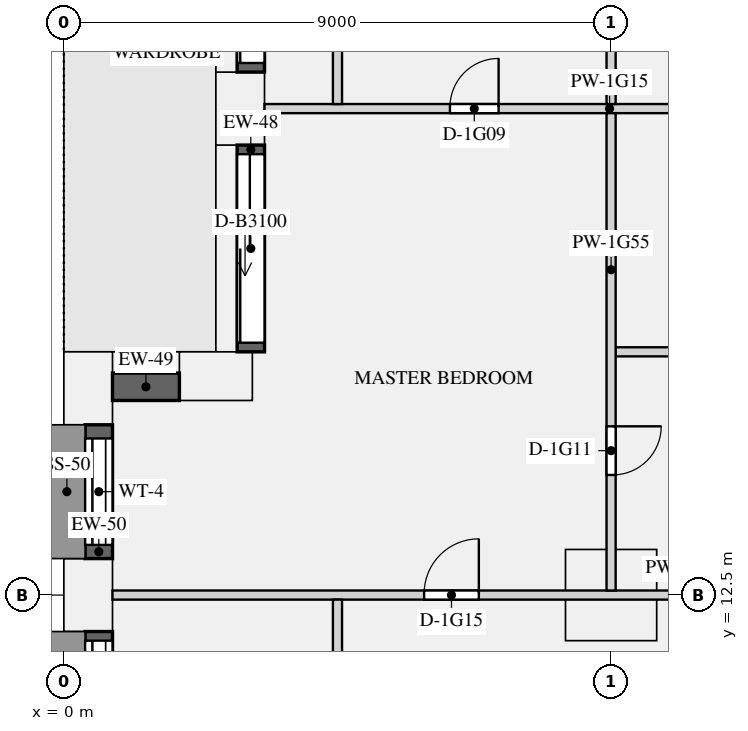
"""IFC4 building model, lengths in metres.
Left out: names, types, materials, properties, quantities, classifications, styles, units other than length and angle.
Written with IfcOpenShell. Run it as: python <this file> out.ifc"""

import sys

from ifc_helpers import new_model, si_unit, direction, frame, frame_2d, origin, origin_2d, place, context, subcontext, project, spatial, rectangle, extrude, element, fill, save


model = new_model("IFC4")
c1 = context("Model", 3, precision=1e-05, world=origin(), true_north=direction((0.0, 1.0)))
c2 = subcontext(c1, "Body", "Model", "MODEL_VIEW")
j1 = project(units=[si_unit("LENGTHUNIT", "METRE"), si_unit("PLANEANGLEUNIT", "RADIAN")], contexts=[c1])
p1 = place(None, origin())
s1 = spatial("IfcSite", under=j1, at=p1, CompositionType="ELEMENT")
p2 = place(p1, origin())
s2 = spatial("IfcBuilding", under=s1, at=p2, CompositionType="ELEMENT")
p3 = place(p2, frame((0.0, 0.0, 69.9)))
s3 = spatial("IfcBuildingStorey", under=s2, at=p3, CompositionType="ELEMENT", Elevation=69.9)
for number, where, z_axis, x_axis in (
    (1, (2.9, 20.5, 0.0), (0.0, 0.0, 1.0), (0.0, -1.0, 0.0)),
    (2, (2.5, 16.1, 0.0), (0.0, 0.0, 1.0), (-1.0, 0.0, 0.0)),
    (3, (0.4, 15.9, 0.0), (0.0, 0.0, 1.0), (0.0, -1.0, 0.0)),
    (4, (0.4, 12.5, 0.0), (0.0, 0.0, 1.0), (0.0, -1.0, 0.0)),
):
    element("IfcColumn", number, at=place(p3, frame(where, z_axis=z_axis, x_axis=x_axis)), inside=s3, PredefinedType="USERDEFINED", context=c2, shape_type="SweptSolid", body=[
        extrude(rectangle(XDim=1.2, YDim=0.8, at=origin_2d()), origin(), (0.0, 0.0, 1.0), 2.65),
    ])
p4 = place(p3, frame((9.0, 12.5, 0.0), z_axis=(0.0, 0.0, 1.0), x_axis=(1.0, 0.0, 0.0)))
e5 = element("IfcColumn", 5, at=p4, inside=s3, PredefinedType="COLUMN", context=c2, shape_type="SweptSolid", body=[
    extrude(rectangle(XDim=1.5, YDim=1.5, at=origin_2d()), origin(), (0.0, 0.0, 1.0), 3.15),
])
p5 = place(p3, frame((3.075, 23.9, 0.0), z_axis=(0.0, 0.0, 1.0), x_axis=(0.0, -1.0, 0.0)))
e6 = element("IfcWall", 6, at=p5, inside=s3, PredefinedType="SOLIDWALL", context=c2, shape_type="SweptSolid", body=[
    extrude(rectangle(XDim=2.8, YDim=0.45, at=frame_2d((1.4, 0.0))), origin(), (0.0, 0.0, 1.0), 2.65),
])
p6 = place(p5, frame((0.15, 0.0, 0.0)))
e7 = element("IfcOpeningElement", 7, at=p6, cuts=e6, PredefinedType="OPENING", context=c2, shape_type="SweptSolid", body=[
    extrude(rectangle(XDim=2.5, YDim=2.3, at=frame_2d((1.25, 1.15))), frame((0.0, 0.235, 0.0), z_axis=(0.0, -1.0, 0.0), x_axis=(1.0, 0.0, 0.0)), (0.0, 0.0, 1.0), 0.47),
])
p7 = place(p3, frame((3.075, 19.9, 0.0), z_axis=(0.0, 0.0, 1.0), x_axis=(0.0, -1.0, 0.0)))
e8 = element("IfcWall", 8, at=p7, inside=s3, PredefinedType="SOLIDWALL", context=c2, shape_type="SweptSolid", body=[
    extrude(rectangle(XDim=3.4, YDim=0.45, at=frame_2d((1.7, 0.0))), origin(), (0.0, 0.0, 1.0), 2.65),
])
p8 = place(p7, frame((0.15, 0.0, 0.0)))
e9 = element("IfcOpeningElement", 9, at=p8, cuts=e8, PredefinedType="OPENING", context=c2, shape_type="SweptSolid", body=[
    extrude(rectangle(XDim=3.1, YDim=2.3, at=frame_2d((1.55, 1.15))), frame((0.0, 0.235, 0.0), z_axis=(0.0, -1.0, 0.0), x_axis=(1.0, 0.0, 0.0)), (0.0, 0.0, 1.0), 0.47),
])
p9 = place(p3, frame((1.9, 15.925, 0.9), z_axis=(0.0, 0.0, 1.0), x_axis=(-1.0, 0.0, 0.0)))
e10 = element("IfcWall", 10, at=p9, inside=s3, PredefinedType="SOLIDWALL", context=c2, shape_type="SweptSolid", body=[
    extrude(rectangle(XDim=1.1, YDim=0.45, at=frame_2d((0.55, 0.0))), origin(), (0.0, 0.0, 1.0), 1.75),
])
p10 = place(p3, frame((0.575, 15.3, 0.9), z_axis=(0.0, 0.0, 1.0), x_axis=(0.0, -1.0, 0.0)))
e11 = element("IfcWall", 11, at=p10, inside=s3, PredefinedType="SOLIDWALL", context=c2, shape_type="SweptSolid", body=[
    extrude(rectangle(XDim=2.2, YDim=0.45, at=frame_2d((1.1, 0.0))), origin(), (0.0, 0.0, 1.0), 1.75),
])
p11 = place(p10, frame((0.225, 0.0, 0.15)))
e12 = element("IfcOpeningElement", 12, at=p11, cuts=e11, PredefinedType="OPENING", context=c2, shape_type="SweptSolid", body=[
    extrude(rectangle(XDim=1.75, YDim=1.5, at=frame_2d((0.875, 0.75))), frame((0.0, 0.235, 0.0), z_axis=(0.0, -1.0, 0.0), x_axis=(1.0, 0.0, 0.0)), (0.0, 0.0, 1.0), 0.47),
])
p12 = place(p3, frame((0.575, 11.9, 0.9), z_axis=(0.0, 0.0, 1.0), x_axis=(0.0, -1.0, 0.0)))
e13 = element("IfcWall", 13, at=p12, inside=s3, PredefinedType="SOLIDWALL", context=c2, shape_type="SweptSolid", body=[
    extrude(rectangle(XDim=2.8, YDim=0.45, at=frame_2d((1.4, 0.0))), origin(), (0.0, 0.0, 1.0), 1.75),
])
p13 = place(p12, frame((0.15, 0.0, 0.15)))
e14 = element("IfcOpeningElement", 14, at=p13, cuts=e13, PredefinedType="OPENING", context=c2, shape_type="SweptSolid", body=[
    extrude(rectangle(XDim=2.5, YDim=1.5, at=frame_2d((1.25, 0.75))), frame((0.0, 0.235, 0.0), z_axis=(0.0, -1.0, 0.0), x_axis=(1.0, 0.0, 0.0)), (0.0, 0.0, 1.0), 0.47),
])
p14 = place(p3, frame((0.8, 12.5, 0.0), z_axis=(0.0, 0.0, 1.0), x_axis=(1.0, 0.0, 0.0)))
e15 = element("IfcWall", 15, at=p14, inside=s3, PredefinedType="PARTITIONING", context=c2, shape_type="SweptSolid", body=[
    extrude(rectangle(XDim=12.775, YDim=0.15, at=frame_2d((6.387, 0.0))), origin(), (0.0, 0.0, 1.0), 2.65),
])
p15 = place(p14, frame((5.125, 0.0, 0.0)))
e16 = element("IfcOpeningElement", 16, at=p15, cuts=e15, PredefinedType="OPENING", context=c2, shape_type="SweptSolid", body=[
    extrude(rectangle(XDim=0.9, YDim=2.1, at=frame_2d((0.45, 1.05))), frame((0.0, 0.085, 0.0), z_axis=(0.0, -1.0, 0.0), x_axis=(1.0, 0.0, 0.0)), (0.0, 0.0, 1.0), 0.17),
])
p16 = place(p3, frame((3.3, 20.5, 0.0), z_axis=(0.0, 0.0, 1.0), x_axis=(1.0, 0.0, 0.0)))
e17 = element("IfcWall", 17, at=p16, inside=s3, PredefinedType="PARTITIONING", context=c2, shape_type="SweptSolid", body=[
    extrude(rectangle(XDim=10.275, YDim=0.15, at=frame_2d((5.137, 0.0))), origin(), (0.0, 0.0, 1.0), 2.65),
])
p17 = place(p16, frame((7.5, 0.0, 0.0)))
e18 = element("IfcOpeningElement", 18, at=p17, cuts=e17, PredefinedType="OPENING", context=c2, shape_type="SweptSolid", body=[
    extrude(rectangle(XDim=0.9, YDim=2.1, at=frame_2d((0.45, 1.05))), frame((0.0, 0.085, 0.0), z_axis=(0.0, -1.0, 0.0), x_axis=(1.0, 0.0, 0.0)), (0.0, 0.0, 1.0), 0.17),
])
p18 = place(p16, frame((3.05, 0.0, 0.0)))
e19 = element("IfcOpeningElement", 19, at=p18, cuts=e17, PredefinedType="OPENING", context=c2, shape_type="SweptSolid", body=[
    extrude(rectangle(XDim=0.8, YDim=2.1, at=frame_2d((0.4, 1.05))), frame((0.0, 0.085, 0.0), z_axis=(0.0, -1.0, 0.0), x_axis=(1.0, 0.0, 0.0)), (0.0, 0.0, 1.0), 0.17),
])
p19 = place(p3, frame((9.075, 16.5, 0.0), z_axis=(0.0, 0.0, 1.0), x_axis=(1.0, 0.0, 0.0)))
e20 = element("IfcWall", 20, at=p19, inside=s3, PredefinedType="PARTITIONING", context=c2, shape_type="SweptSolid", body=[
    extrude(rectangle(XDim=4.35, YDim=0.15, at=frame_2d((2.175, 0.0))), origin(), (0.0, 0.0, 1.0), 2.65),
])
p20 = place(p3, frame((4.5, 5.3, 0.0), z_axis=(0.0, 0.0, 1.0), x_axis=(0.0, 1.0, 0.0)))
e21 = element("IfcWall", 21, at=p20, inside=s3, PredefinedType="PARTITIONING", context=c2, shape_type="SweptSolid", body=[
    extrude(rectangle(XDim=7.125, YDim=0.15, at=frame_2d((3.562, 0.0))), origin(), (0.0, 0.0, 1.0), 2.65),
])
p21 = place(p20, frame((4.75, 0.0, 0.0)))
e22 = element("IfcOpeningElement", 22, at=p21, cuts=e21, PredefinedType="OPENING", context=c2, shape_type="SweptSolid", body=[
    extrude(rectangle(XDim=0.9, YDim=2.1, at=frame_2d((0.45, 1.05))), frame((0.0, 0.085, 0.0), z_axis=(0.0, -1.0, 0.0), x_axis=(1.0, 0.0, 0.0)), (0.0, 0.0, 1.0), 0.17),
])
p22 = place(p20, frame((0.775, 0.0, 0.0)))
e23 = element("IfcOpeningElement", 23, at=p22, cuts=e21, PredefinedType="OPENING", context=c2, shape_type="SweptSolid", body=[
    extrude(rectangle(XDim=1.5, YDim=2.1, at=frame_2d((0.75, 1.05))), frame((0.0, 0.085, 0.0), z_axis=(0.0, -1.0, 0.0), x_axis=(1.0, 0.0, 0.0)), (0.0, 0.0, 1.0), 0.17),
])
p23 = place(p3, frame((4.5, 20.575, 0.0), z_axis=(0.0, 0.0, 1.0), x_axis=(0.0, 1.0, 0.0)))
e24 = element("IfcWall", 24, at=p23, inside=s3, PredefinedType="PARTITIONING", context=c2, shape_type="SweptSolid", body=[
    extrude(rectangle(XDim=3.35, YDim=0.15, at=frame_2d((1.675, 0.0))), origin(), (0.0, 0.0, 1.0), 2.65),
])
p24 = place(p23, frame((1.275, 0.0, 0.0)))
e25 = element("IfcOpeningElement", 25, at=p24, cuts=e24, PredefinedType="OPENING", context=c2, shape_type="SweptSolid", body=[
    extrude(rectangle(XDim=0.8, YDim=2.1, at=frame_2d((0.4, 1.05))), frame((0.0, 0.085, 0.0), z_axis=(0.0, -1.0, 0.0), x_axis=(1.0, 0.0, 0.0)), (0.0, 0.0, 1.0), 0.17),
])
p25 = place(p3, frame((9.0, 12.575, 0.0), z_axis=(0.0, 0.0, 1.0), x_axis=(0.0, 1.0, 0.0)))
e26 = element("IfcWall", 26, at=p25, inside=s3, PredefinedType="PARTITIONING", context=c2, shape_type="SweptSolid", body=[
    extrude(rectangle(XDim=7.85, YDim=0.15, at=frame_2d((3.925, 0.0))), origin(), (0.0, 0.0, 1.0), 2.65),
])
p26 = place(p25, frame((1.9, 0.0, 0.0)))
e27 = element("IfcOpeningElement", 27, at=p26, cuts=e26, PredefinedType="OPENING", context=c2, shape_type="SweptSolid", body=[
    extrude(rectangle(XDim=0.8, YDim=2.1, at=frame_2d((0.4, 1.05))), frame((0.0, 0.085, 0.0), z_axis=(0.0, -1.0, 0.0), x_axis=(1.0, 0.0, 0.0)), (0.0, 0.0, 1.0), 0.17),
])
p27 = place(p3, frame((9.0, 20.575, 0.0), z_axis=(0.0, 0.0, 1.0), x_axis=(0.0, 1.0, 0.0)))
e28 = element("IfcWall", 28, at=p27, inside=s3, PredefinedType="PARTITIONING", context=c2, shape_type="SweptSolid", body=[
    extrude(rectangle(XDim=11.725, YDim=0.15, at=frame_2d((5.863, 0.0))), origin(), (0.0, 0.0, 1.0), 2.65),
])
p28 = place(p27, frame((5.6, 0.0, 0.0)))
e29 = element("IfcOpeningElement", 29, at=p28, cuts=e28, PredefinedType="OPENING", context=c2, shape_type="SweptSolid", body=[
    extrude(rectangle(XDim=0.9, YDim=2.1, at=frame_2d((0.45, 1.05))), frame((0.0, 0.085, 0.0), z_axis=(0.0, -1.0, 0.0), x_axis=(1.0, 0.0, 0.0)), (0.0, 0.0, 1.0), 0.17),
])
p29 = place(p27, frame((9.413, 0.0, 0.0)))
e30 = element("IfcOpeningElement", 30, at=p29, cuts=e28, PredefinedType="OPENING", context=c2, shape_type="SweptSolid", body=[
    extrude(rectangle(XDim=0.9, YDim=2.1, at=frame_2d((0.45, 1.05))), frame((0.0, 0.085, 0.0), z_axis=(0.0, -1.0, 0.0), x_axis=(1.0, 0.0, 0.0)), (0.0, 0.0, 1.0), 0.17),
])
p30 = place(p6, origin())
e31 = element("IfcDoor", 31, at=p30, inside=s3, OperationType="SLIDING_TO_LEFT", PredefinedType="DOOR", context=c2, shape_type="SweptSolid", body=[
    extrude(rectangle(XDim=2.5, YDim=2.3, at=frame_2d((1.25, 1.15))), frame((0.0, -0.07, 0.0), z_axis=(0.0, -1.0, 0.0), x_axis=(1.0, 0.0, 0.0)), (0.0, 0.0, 1.0), 0.05),
])
fill(e7, e31)
p31 = place(p8, origin())
e32 = element("IfcDoor", 32, at=p31, inside=s3, OperationType="SLIDING_TO_LEFT", PredefinedType="DOOR", context=c2, shape_type="SweptSolid", body=[
    extrude(rectangle(XDim=3.1, YDim=2.3, at=frame_2d((1.55, 1.15))), frame((0.0, -0.07, 0.0), z_axis=(0.0, -1.0, 0.0), x_axis=(1.0, 0.0, 0.0)), (0.0, 0.0, 1.0), 0.05),
])
fill(e9, e32)
p32 = place(p11, origin())
e33 = element("IfcWindow", 33, at=p32, inside=s3, PartitioningType="SINGLE_PANEL", PredefinedType="WINDOW", context=c2, shape_type="SweptSolid", body=[
    extrude(rectangle(XDim=1.75, YDim=1.5, at=frame_2d((0.875, 0.75))), frame((0.0, -0.065, 0.0), z_axis=(0.0, -1.0, 0.0), x_axis=(1.0, 0.0, 0.0)), (0.0, 0.0, 1.0), 0.06),
])
fill(e12, e33)
p33 = place(p13, origin())
e34 = element("IfcWindow", 34, at=p33, inside=s3, PartitioningType="SINGLE_PANEL", PredefinedType="WINDOW", context=c2, shape_type="SweptSolid", body=[
    extrude(rectangle(XDim=2.5, YDim=1.5, at=frame_2d((1.25, 0.75))), frame((0.0, -0.065, 0.0), z_axis=(0.0, -1.0, 0.0), x_axis=(1.0, 0.0, 0.0)), (0.0, 0.0, 1.0), 0.06),
])
fill(e14, e34)
p34 = place(p18, origin())
e35 = element("IfcDoor", 35, at=p34, inside=s3, OperationType="SINGLE_SWING_RIGHT", PredefinedType="DOOR", context=c2, shape_type="SweptSolid", body=[
    extrude(rectangle(XDim=0.8, YDim=2.1, at=frame_2d((0.4, 1.05))), frame((0.0, 0.025, 0.0), z_axis=(0.0, -1.0, 0.0), x_axis=(1.0, 0.0, 0.0)), (0.0, 0.0, 1.0), 0.05),
])
fill(e19, e35)
p35 = place(p26, frame((0.8, 0.0, 0.0), z_axis=(0.0, 0.0, 1.0), x_axis=(-1.0, 0.0, 0.0)))
e36 = element("IfcDoor", 36, at=p35, inside=s3, OperationType="SINGLE_SWING_LEFT", PredefinedType="DOOR", context=c2, shape_type="SweptSolid", body=[
    extrude(rectangle(XDim=0.8, YDim=2.1, at=frame_2d((0.4, 1.05))), frame((0.0, 0.025, 0.0), z_axis=(0.0, -1.0, 0.0), x_axis=(1.0, 0.0, 0.0)), (0.0, 0.0, 1.0), 0.05),
])
fill(e27, e36)
p36 = place(p15, origin())
e37 = element("IfcDoor", 37, at=p36, inside=s3, OperationType="SINGLE_SWING_RIGHT", PredefinedType="DOOR", context=c2, shape_type="SweptSolid", body=[
    extrude(rectangle(XDim=0.9, YDim=2.1, at=frame_2d((0.45, 1.05))), frame((0.0, 0.025, 0.0), z_axis=(0.0, -1.0, 0.0), x_axis=(1.0, 0.0, 0.0)), (0.0, 0.0, 1.0), 0.05),
])
fill(e16, e37)
save(model, sys.argv[1])
